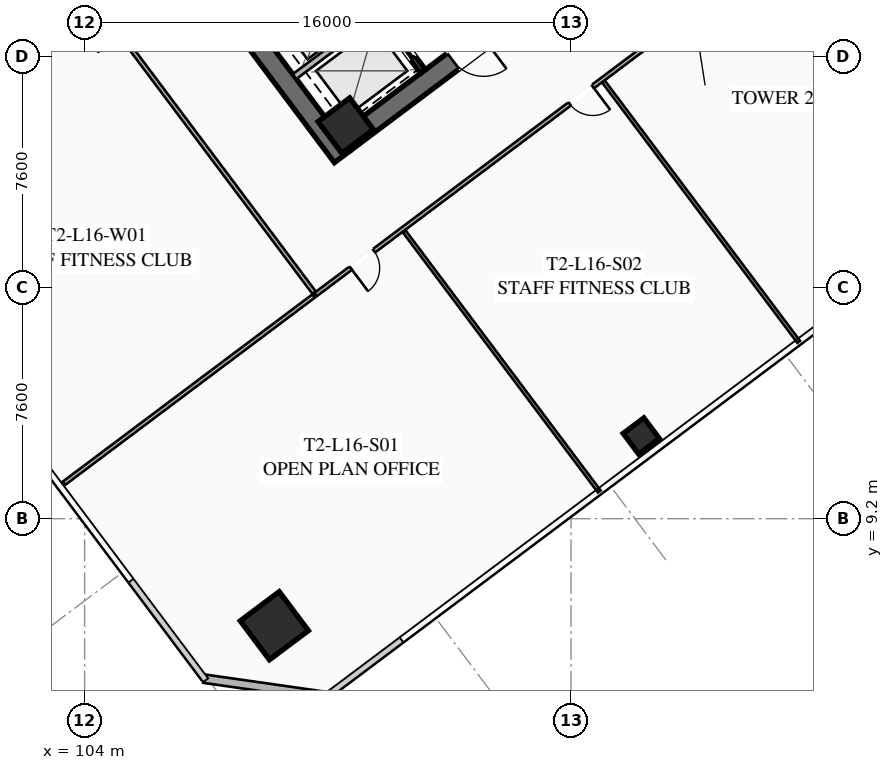
"""IFC4 building model, lengths in metres.
Left out: names, types, materials, properties, quantities, classifications, styles, units other than length and angle.
Written with IfcOpenShell. Run it as: python <this file> out.ifc"""

import sys

from ifc_helpers import new_model, si_unit, direction, frame, frame_2d, origin, origin_2d, place, context, subcontext, project, spatial, rectangle, hollow_rectangle, extrude, element, fill, save


model = new_model("IFC4")
c1 = context("Model", 3, precision=1e-05, world=origin(), true_north=direction((0.0, 1.0)))
c2 = subcontext(c1, "Body", "Model", "MODEL_VIEW")
j1 = project(units=[si_unit("LENGTHUNIT", "METRE"), si_unit("PLANEANGLEUNIT", "RADIAN")], contexts=[c1])
p1 = place(None, origin())
s1 = spatial("IfcSite", under=j1, at=p1, CompositionType="ELEMENT")
p2 = place(p1, origin())
s2 = spatial("IfcBuilding", under=s1, at=p2, CompositionType="ELEMENT")
p3 = place(p2, frame((0.0, 0.0, 63.65)))
s3 = spatial("IfcBuildingStorey", under=s2, at=p3, CompositionType="ELEMENT", Elevation=63.65)
p4 = place(p3, frame((112.476, 21.107, 0.0), z_axis=(0.0, 0.0, 1.0), x_axis=(-0.600005007985, 0.799996243986, 0.0)))
e1 = element("IfcWall", 1, at=p4, inside=s3, PredefinedType="SHEAR", context=c2, shape_type="SweptSolid", body=[
    extrude(rectangle(XDim=15.6, YDim=0.65, at=frame_2d((7.8, 0.0))), origin(), (0.0, 0.0, 1.0), 3.55),
])
p5 = place(p3, frame((124.429, 30.478, 0.0), z_axis=(0.0, 0.0, 1.0), x_axis=(-0.799998028465, -0.600002628705, 0.0)))
e2 = element("IfcWall", 2, at=p5, inside=s3, PredefinedType="SHEAR", context=c2, shape_type="SweptSolid", body=[
    extrude(rectangle(XDim=14.86, YDim=0.65, at=frame_2d((7.43, 0.0))), origin(), (0.0, 0.0, 1.0), 3.55),
])
p6 = place(p5, frame((9.13, 0.0, 0.0)))
e3 = element("IfcOpeningElement", 3, at=p6, cuts=e2, PredefinedType="OPENING", context=c2, shape_type="SweptSolid", body=[
    extrude(rectangle(XDim=1.25, YDim=2.25, at=frame_2d((0.625, 1.125))), frame((0.0, 0.335, 0.0), z_axis=(0.0, -1.0, 0.0), x_axis=(1.0, 0.0, 0.0)), (0.0, 0.0, 1.0), 0.67),
])
p7 = place(p5, frame((4.08, 0.0, 0.0)))
e4 = element("IfcOpeningElement", 4, at=p7, cuts=e2, PredefinedType="OPENING", context=c2, shape_type="SweptSolid", body=[
    extrude(rectangle(XDim=1.25, YDim=2.25, at=frame_2d((0.625, 1.125))), frame((0.0, 0.335, 0.0), z_axis=(0.0, -1.0, 0.0), x_axis=(1.0, 0.0, 0.0)), (0.0, 0.0, 1.0), 0.67),
])
p8 = place(p3, frame((112.59, 22.13, 0.0), z_axis=(0.0, 0.0, 1.0), x_axis=(0.799999996291, 0.600000004945, 0.0)))
e5 = element("IfcColumn", 5, at=p8, inside=s3, PredefinedType="COLUMN", context=c2, shape_type="SweptSolid", body=[
    extrude(hollow_rectangle(XDim=1.3, YDim=1.3, WallThickness=0.05, at=origin_2d()), origin(), (0.0, 0.0, 1.0), 3.35),
])
p9 = place(p3, frame((110.24, 5.68, 0.0), z_axis=(0.0, 0.0, 1.0), x_axis=(0.799999996291, 0.600000004945, 0.0)))
e6 = element("IfcColumn", 6, at=p9, inside=s3, PredefinedType="COLUMN", context=c2, shape_type="SweptSolid", body=[
    extrude(hollow_rectangle(XDim=1.6, YDim=1.6, WallThickness=0.06, at=origin_2d()), origin(), (0.0, 0.0, 1.0), 3.35),
])
p10 = place(p3, frame((122.31, 11.92, 0.0), z_axis=(0.0, 0.0, 1.0), x_axis=(0.799999996291, 0.600000004945, 0.0)))
e7 = element("IfcColumn", 7, at=p10, inside=s3, PredefinedType="COLUMN", context=c2, shape_type="SweptSolid", body=[
    extrude(hollow_rectangle(XDim=0.85, YDim=0.85, WallThickness=0.035, at=origin_2d()), origin(), (0.0, 0.0, 1.0), 3.35),
])
p11 = place(p3, frame((111.98, 3.36, 0.0), z_axis=(0.0, 0.0, 1.0), x_axis=(-0.989955445613, 0.14137968631, 0.0)))
e8 = element("IfcWall", 8, at=p11, inside=s3, PredefinedType="SOLIDWALL", context=c2, shape_type="SweptSolid", body=[
    extrude(rectangle(XDim=4.101, YDim=0.28, at=frame_2d((2.051, 0.0))), origin(), (0.0, 0.0, 1.0), 3.35),
])
p12 = place(p3, frame((115.13, 23.91, 0.0), z_axis=(0.0, 0.0, 1.0), x_axis=(-0.599975393228, 0.800018454488, 0.0)))
e9 = element("IfcWall", 9, at=p12, inside=s3, PredefinedType="SHEAR", context=c2, shape_type="SweptSolid", body=[
    extrude(rectangle(XDim=6.35, YDim=0.2, at=frame_2d((3.175, 0.0))), origin(), (0.0, 0.0, 1.0), 3.35),
])
p13 = place(p12, frame((4.775, 0.0, 0.0)))
e10 = element("IfcOpeningElement", 10, at=p13, cuts=e9, PredefinedType="OPENING", context=c2, shape_type="SweptSolid", body=[
    extrude(rectangle(XDim=1.3, YDim=2.25, at=frame_2d((0.65, 1.125))), frame((0.0, 0.11, 0.0), z_axis=(0.0, -1.0, 0.0), x_axis=(1.0, 0.0, 0.0)), (0.0, 0.0, 1.0), 0.22),
])
p14 = place(p12, frame((2.775, 0.0, 0.0)))
e11 = element("IfcOpeningElement", 11, at=p14, cuts=e9, PredefinedType="OPENING", context=c2, shape_type="SweptSolid", body=[
    extrude(rectangle(XDim=1.3, YDim=2.25, at=frame_2d((0.65, 1.125))), frame((0.0, 0.11, 0.0), z_axis=(0.0, -1.0, 0.0), x_axis=(1.0, 0.0, 0.0)), (0.0, 0.0, 1.0), 0.22),
])
p15 = place(p12, frame((0.575, 0.0, 0.0)))
e12 = element("IfcOpeningElement", 12, at=p15, cuts=e9, PredefinedType="OPENING", context=c2, shape_type="SweptSolid", body=[
    extrude(rectangle(XDim=1.3, YDim=2.25, at=frame_2d((0.65, 1.125))), frame((0.0, 0.11, 0.0), z_axis=(0.0, -1.0, 0.0), x_axis=(1.0, 0.0, 0.0)), (0.0, 0.0, 1.0), 0.22),
])
p16 = place(p3, frame((110.906, 23.742, 0.0), z_axis=(0.0, 0.0, 1.0), x_axis=(0.8, 0.6, 0.0)))
e13 = element("IfcWall", 13, at=p16, inside=s3, PredefinedType="SOLIDWALL", context=c2, shape_type="SweptSolid", body=[
    extrude(rectangle(XDim=3.38, YDim=0.2, at=frame_2d((1.69, 0.0))), origin(), (0.0, 0.0, 1.0), 3.35),
])
p17 = place(p3, frame((135.46, 34.47, 0.0), z_axis=(0.0, 0.0, 1.0), x_axis=(-0.800000982127, -0.599998690494, 0.0)))
e14 = element("IfcWall", 14, at=p17, inside=s3, PredefinedType="PARTITIONING", context=c2, shape_type="SweptSolid", body=[
    extrude(rectangle(XDim=29.83, YDim=0.135, at=frame_2d((14.915, 0.0))), origin(), (0.0, 0.0, 1.0), 2.493),
])
p18 = place(p17, frame((27.431, 0.0, 0.0)))
e15 = element("IfcOpeningElement", 15, at=p18, cuts=e14, PredefinedType="OPENING", context=c2, shape_type="SweptSolid", body=[
    extrude(rectangle(XDim=0.95, YDim=2.05, at=frame_2d((0.475, 1.025))), frame((0.0, 0.077, 0.0), z_axis=(0.0, -1.0, 0.0), x_axis=(1.0, 0.0, 0.0)), (0.0, 0.0, 1.0), 0.155),
])
p19 = place(p17, frame((18.43, 0.0, 0.0)))
e16 = element("IfcOpeningElement", 16, at=p19, cuts=e14, PredefinedType="OPENING", context=c2, shape_type="SweptSolid", body=[
    extrude(rectangle(XDim=0.95, YDim=2.05, at=frame_2d((0.475, 1.025))), frame((0.0, 0.077, 0.0), z_axis=(0.0, -1.0, 0.0), x_axis=(1.0, 0.0, 0.0)), (0.0, 0.0, 1.0), 0.155),
])
p20 = place(p17, frame((0.38, 0.0, 0.0)))
e17 = element("IfcOpeningElement", 17, at=p20, cuts=e14, PredefinedType="OPENING", context=c2, shape_type="SweptSolid", body=[
    extrude(rectangle(XDim=0.95, YDim=2.05, at=frame_2d((0.475, 1.025))), frame((0.0, 0.077, 0.0), z_axis=(0.0, -1.0, 0.0), x_axis=(1.0, 0.0, 0.0)), (0.0, 0.0, 1.0), 0.155),
])
p21 = place(p3, frame((120.928, 10.096, 0.0), z_axis=(0.0, 0.0, 1.0), x_axis=(-0.599992698573, 0.800005476018, 0.0)))
e18 = element("IfcWall", 18, at=p21, inside=s3, PredefinedType="PARTITIONING", context=c2, shape_type="SweptSolid", body=[
    extrude(rectangle(XDim=10.7, YDim=0.11, at=frame_2d((5.35, 0.0))), origin(), (0.0, 0.0, 1.0), 2.493),
])
p22 = place(p3, frame((127.488, 15.016, 0.0), z_axis=(0.0, 0.0, 1.0), x_axis=(-0.600003650761, 0.799997261916, 0.0)))
e19 = element("IfcWall", 19, at=p22, inside=s3, PredefinedType="PARTITIONING", context=c2, shape_type="SweptSolid", body=[
    extrude(rectangle(XDim=10.7, YDim=0.11, at=frame_2d((5.35, 0.0))), origin(), (0.0, 0.0, 1.0), 2.493),
])
p23 = place(p3, frame((111.548, 16.636, 0.0), z_axis=(0.0, 0.0, 1.0), x_axis=(-0.600003610192, 0.799997292343, 0.0)))
e20 = element("IfcWall", 20, at=p23, inside=s3, PredefinedType="PARTITIONING", context=c2, shape_type="SweptSolid", body=[
    extrude(rectangle(XDim=21.64, YDim=0.135, at=frame_2d((10.82, 0.0))), origin(), (0.0, 0.0, 1.0), 2.493),
])
p24 = place(p23, frame((10.596, 0.0, 0.0)))
e21 = element("IfcOpeningElement", 21, at=p24, cuts=e20, PredefinedType="OPENING", context=c2, shape_type="SweptSolid", body=[
    extrude(rectangle(XDim=0.95, YDim=2.05, at=frame_2d((0.475, 1.025))), frame((0.0, 0.077, 0.0), z_axis=(0.0, -1.0, 0.0), x_axis=(1.0, 0.0, 0.0)), (0.0, 0.0, 1.0), 0.155),
])
p25 = place(p3, frame((103.316, 10.362, 0.0), z_axis=(0.0, 0.0, 1.0), x_axis=(0.80000855794, 0.599988589244, 0.0)))
e22 = element("IfcWall", 22, at=p25, inside=s3, PredefinedType="PARTITIONING", context=c2, shape_type="SweptSolid", body=[
    extrude(rectangle(XDim=10.27, YDim=0.135, at=frame_2d((5.135, 0.0))), origin(), (0.0, 0.0, 1.0), 2.493),
])
p26 = place(p6, origin())
e23 = element("IfcDoor", 23, at=p26, inside=s3, OperationType="SINGLE_SWING_LEFT", PredefinedType="DOOR", context=c2, shape_type="SweptSolid", body=[
    extrude(rectangle(XDim=1.25, YDim=2.25, at=frame_2d((0.625, 1.125))), frame((0.0, 0.025, 0.0), z_axis=(0.0, -1.0, 0.0), x_axis=(1.0, 0.0, 0.0)), (0.0, 0.0, 1.0), 0.05),
])
fill(e3, e23)
p27 = place(p18, origin())
e24 = element("IfcDoor", 24, at=p27, inside=s3, OperationType="SINGLE_SWING_RIGHT", PredefinedType="DOOR", context=c2, shape_type="SweptSolid", body=[
    extrude(rectangle(XDim=0.95, YDim=2.05, at=frame_2d((0.475, 1.025))), frame((0.0, 0.025, 0.0), z_axis=(0.0, -1.0, 0.0), x_axis=(1.0, 0.0, 0.0)), (0.0, 0.0, 1.0), 0.05),
])
fill(e15, e24)
p28 = place(p19, origin())
e25 = element("IfcDoor", 25, at=p28, inside=s3, OperationType="SINGLE_SWING_LEFT", PredefinedType="DOOR", context=c2, shape_type="SweptSolid", body=[
    extrude(rectangle(XDim=0.95, YDim=2.05, at=frame_2d((0.475, 1.025))), frame((0.0, 0.025, 0.0), z_axis=(0.0, -1.0, 0.0), x_axis=(1.0, 0.0, 0.0)), (0.0, 0.0, 1.0), 0.05),
])
fill(e16, e25)
p29 = place(p15, origin())
e26 = element("IfcDoor", 26, at=p29, inside=s3, OperationType="SLIDING_TO_LEFT", PredefinedType="DOOR", context=c2, shape_type="SweptSolid", body=[
    extrude(rectangle(XDim=1.3, YDim=2.25, at=frame_2d((0.65, 1.125))), frame((0.0, 0.025, 0.0), z_axis=(0.0, -1.0, 0.0), x_axis=(1.0, 0.0, 0.0)), (0.0, 0.0, 1.0), 0.05),
])
fill(e12, e26)
save(model, sys.argv[1])
